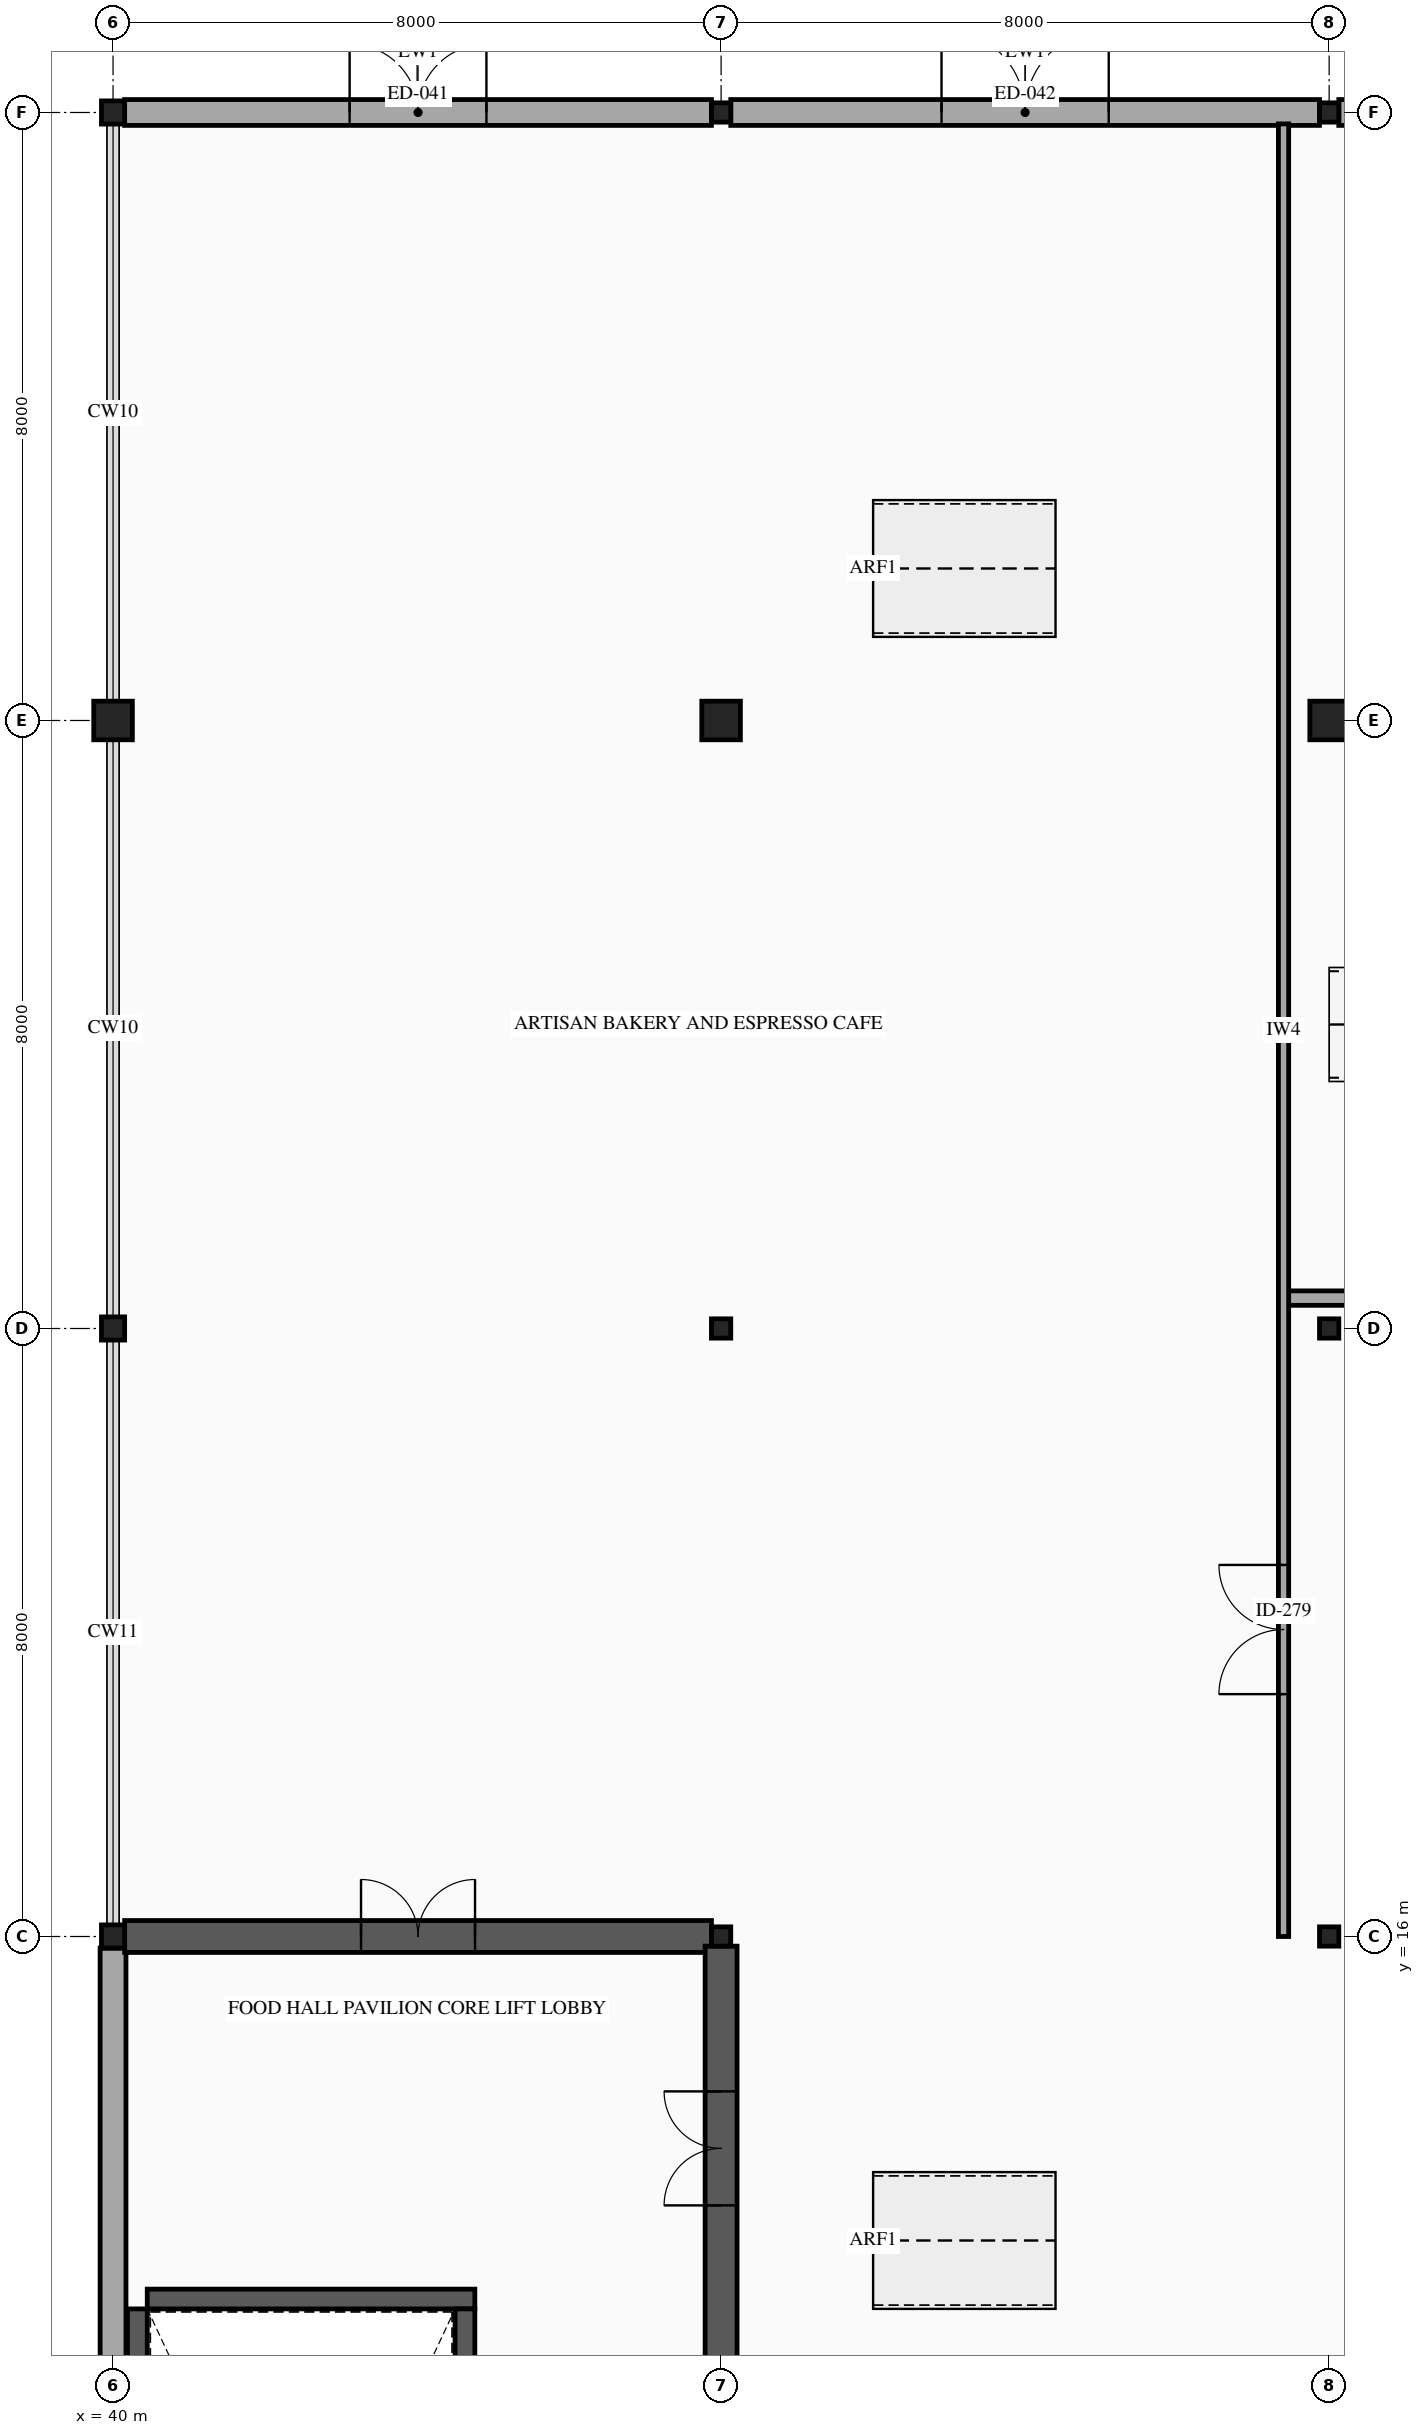
"""IFC4 building model, lengths in metres.
Left out: names, types, materials, properties, quantities, classifications, styles, units other than length and angle.
Written with IfcOpenShell. Run it as: python <this file> out.ifc"""

import sys

from ifc_helpers import new_model, si_unit, direction, frame, frame_2d, origin, origin_2d, place, context, subcontext, project, spatial, rectangle, hollow_rectangle, hollow_circle, extrude, element, fill, save


model = new_model("IFC4")
c1 = context("Model", 3, precision=1e-05, world=origin(), true_north=direction((0.0, 1.0)))
c2 = subcontext(c1, "Body", "Model", "MODEL_VIEW")
j1 = project(units=[si_unit("LENGTHUNIT", "METRE"), si_unit("PLANEANGLEUNIT", "RADIAN")], contexts=[c1])
p1 = place(None, origin())
s1 = spatial("IfcSite", under=j1, at=p1, CompositionType="ELEMENT")
p2 = place(p1, origin())
s2 = spatial("IfcBuilding", under=s1, at=p2, CompositionType="ELEMENT")
p3 = place(p2, origin())
s3 = spatial("IfcBuildingStorey", under=s2, at=p3, CompositionType="ELEMENT", Elevation=0.0)
for number, where, z_axis, x_axis in (
    (1, (40.0, 16.0, 0.0), (0.0, 0.0, 1.0), (1.0, 0.0, 0.0)),
    (2, (40.0, 24.0, 0.0), (0.0, 0.0, 1.0), (1.0, 0.0, 0.0)),
):
    element("IfcColumn", number, at=place(p3, frame(where, z_axis=z_axis, x_axis=x_axis)), inside=s3, PredefinedType="COLUMN", context=c2, shape_type="SweptSolid", body=[
        extrude(hollow_rectangle(XDim=0.305, YDim=0.305, WallThickness=0.012, InnerFilletRadius=0.012, OuterFilletRadius=0.024, at=origin_2d()), origin(), (0.0, 0.0, 1.0), 5.6),
    ])
p4 = place(p3, frame((40.0, 32.0, 0.0), z_axis=(0.0, 0.0, 1.0), x_axis=(1.0, 0.0, 0.0)))
e3 = element("IfcColumn", 3, at=p4, inside=s3, PredefinedType="COLUMN", context=c2, shape_type="SweptSolid", body=[
    extrude(hollow_circle(Radius=0.254, WallThickness=0.012, at=origin_2d()), origin(), (0.0, 0.0, 1.0), 5.6),
])
p5 = place(p3, frame((40.0, 40.0, 0.0), z_axis=(0.0, 0.0, 1.0), x_axis=(1.0, 0.0, 0.0)))
e4 = element("IfcColumn", 4, at=p5, inside=s3, PredefinedType="COLUMN", context=c2, shape_type="SweptSolid", body=[
    extrude(hollow_rectangle(XDim=0.305, YDim=0.305, WallThickness=0.012, InnerFilletRadius=0.012, OuterFilletRadius=0.024, at=origin_2d()), origin(), (0.0, 0.0, 1.0), 5.6),
])
for number, where, z_axis, x_axis in (
    (5, (48.0, 16.0, 0.0), (0.0, 0.0, 1.0), (1.0, 0.0, 0.0)),
    (6, (48.0, 24.0, 0.0), (0.0, 0.0, 1.0), (1.0, 0.0, 0.0)),
):
    element("IfcColumn", number, at=place(p3, frame(where, z_axis=z_axis, x_axis=x_axis)), inside=s3, PredefinedType="COLUMN", context=c2, shape_type="SweptSolid", body=[
        extrude(hollow_rectangle(XDim=0.254, YDim=0.254, WallThickness=0.009, InnerFilletRadius=0.009, OuterFilletRadius=0.018, at=origin_2d()), origin(), (0.0, 0.0, 1.0), 5.6),
    ])
p6 = place(p3, frame((48.0, 32.0, 0.0), z_axis=(0.0, 0.0, 1.0), x_axis=(1.0, 0.0, 0.0)))
e7 = element("IfcColumn", 7, at=p6, inside=s3, PredefinedType="COLUMN", context=c2, shape_type="SweptSolid", body=[
    extrude(hollow_circle(Radius=0.254, WallThickness=0.012, at=origin_2d()), origin(), (0.0, 0.0, 1.0), 5.6),
])
for number, where, z_axis, x_axis in (
    (8, (48.0, 40.0, 0.0), (0.0, 0.0, 1.0), (1.0, 0.0, 0.0)),
    (9, (56.0, 16.0, 0.0), (0.0, 0.0, 1.0), (1.0, 0.0, 0.0)),
    (10, (56.0, 24.0, 0.0), (0.0, 0.0, 1.0), (1.0, 0.0, 0.0)),
):
    element("IfcColumn", number, at=place(p3, frame(where, z_axis=z_axis, x_axis=x_axis)), inside=s3, PredefinedType="COLUMN", context=c2, shape_type="SweptSolid", body=[
        extrude(hollow_rectangle(XDim=0.254, YDim=0.254, WallThickness=0.009, InnerFilletRadius=0.009, OuterFilletRadius=0.018, at=origin_2d()), origin(), (0.0, 0.0, 1.0), 5.6),
    ])
p7 = place(p3, frame((56.0, 32.0, 0.0), z_axis=(0.0, 0.0, 1.0), x_axis=(1.0, 0.0, 0.0)))
e11 = element("IfcColumn", 11, at=p7, inside=s3, PredefinedType="COLUMN", context=c2, shape_type="SweptSolid", body=[
    extrude(hollow_circle(Radius=0.254, WallThickness=0.012, at=origin_2d()), origin(), (0.0, 0.0, 1.0), 5.6),
])
p8 = place(p3, frame((56.0, 40.0, 0.0), z_axis=(0.0, 0.0, 1.0), x_axis=(1.0, 0.0, 0.0)))
e12 = element("IfcColumn", 12, at=p8, inside=s3, PredefinedType="COLUMN", context=c2, shape_type="SweptSolid", body=[
    extrude(hollow_rectangle(XDim=0.254, YDim=0.254, WallThickness=0.009, InnerFilletRadius=0.009, OuterFilletRadius=0.018, at=origin_2d()), origin(), (0.0, 0.0, 1.0), 5.6),
])
p9 = place(p3, frame((40.0, 8.153, 0.0), z_axis=(0.0, 0.0, 1.0), x_axis=(0.0, 1.0, 0.0)))
e13 = element("IfcWall", 13, at=p9, inside=s3, PredefinedType="STANDARD", context=c2, shape_type="SweptSolid", body=[
    extrude(rectangle(XDim=7.695, YDim=0.34, at=frame_2d((3.847, 0.0))), origin(), (0.0, 0.0, 1.0), 4.58),
])
p10 = place(p3, frame((40.153, 40.0, 0.0), z_axis=(0.0, 0.0, 1.0), x_axis=(1.0, 0.0, 0.0)))
e14 = element("IfcWall", 14, at=p10, inside=s3, PredefinedType="STANDARD", context=c2, shape_type="SweptSolid", body=[
    extrude(rectangle(XDim=7.72, YDim=0.34, at=frame_2d((3.86, 0.0))), origin(), (0.0, 0.0, 1.0), 4.58),
])
p11 = place(p10, frame((2.96, 0.0, 0.0)))
e15 = element("IfcOpeningElement", 15, at=p11, cuts=e14, PredefinedType="OPENING", context=c2, shape_type="SweptSolid", body=[
    extrude(rectangle(XDim=1.8, YDim=2.3, at=frame_2d((0.9, 1.15))), frame((0.0, 0.18, 0.0), z_axis=(0.0, -1.0, 0.0), x_axis=(1.0, 0.0, 0.0)), (0.0, 0.0, 1.0), 0.36),
])
p12 = place(p3, frame((48.127, 40.0, 0.0), z_axis=(0.0, 0.0, 1.0), x_axis=(1.0, 0.0, 0.0)))
e16 = element("IfcWall", 16, at=p12, inside=s3, PredefinedType="STANDARD", context=c2, shape_type="SweptSolid", body=[
    extrude(rectangle(XDim=7.746, YDim=0.34, at=frame_2d((3.873, 0.0))), origin(), (0.0, 0.0, 1.0), 4.58),
])
p13 = place(p12, frame((2.773, 0.0, 0.0)))
e17 = element("IfcOpeningElement", 17, at=p13, cuts=e16, PredefinedType="OPENING", context=c2, shape_type="SweptSolid", body=[
    extrude(rectangle(XDim=2.2, YDim=2.45, at=frame_2d((1.1, 1.225))), frame((0.0, 0.18, 0.0), z_axis=(0.0, -1.0, 0.0), x_axis=(1.0, 0.0, 0.0)), (0.0, 0.0, 1.0), 0.36),
])
p14 = place(p3, frame((56.127, 40.0, 0.0), z_axis=(0.0, 0.0, 1.0), x_axis=(1.0, 0.0, 0.0)))
e18 = element("IfcWall", 18, at=p14, inside=s3, PredefinedType="STANDARD", context=c2, shape_type="SweptSolid", body=[
    extrude(rectangle(XDim=7.746, YDim=0.34, at=frame_2d((3.873, 0.0))), origin(), (0.0, 0.0, 1.0), 4.58),
])
p15 = place(p14, frame((2.873, 0.0, 0.0)))
e19 = element("IfcOpeningElement", 19, at=p15, cuts=e18, PredefinedType="OPENING", context=c2, shape_type="SweptSolid", body=[
    extrude(rectangle(XDim=2.0, YDim=2.35, at=frame_2d((1.0, 1.175))), frame((0.0, 0.18, 0.0), z_axis=(0.0, -1.0, 0.0), x_axis=(1.0, 0.0, 0.0)), (0.0, 0.0, 1.0), 0.36),
])
p16 = place(p3, frame((40.45, 11.23, 0.0), z_axis=(0.0, 0.0, 1.0), x_axis=(1.0, 0.0, 0.0)))
e20 = element("IfcWall", 20, at=p16, inside=s3, PredefinedType="SHEAR", context=c2, shape_type="SweptSolid", body=[
    extrude(rectangle(XDim=4.31, YDim=0.26, at=frame_2d((2.155, 0.0))), origin(), (0.0, 0.0, 1.0), 5.38),
])
p17 = place(p3, frame((40.32, 0.145, 0.0), z_axis=(0.0, 0.0, 1.0), x_axis=(0.0, 1.0, 0.0)))
e21 = element("IfcWall", 21, at=p17, inside=s3, PredefinedType="SHEAR", context=c2, shape_type="SweptSolid", body=[
    extrude(rectangle(XDim=10.955, YDim=0.26, at=frame_2d((5.478, 0.0))), origin(), (0.0, 0.0, 1.0), 5.38),
])
p18 = place(p3, frame((44.63, 0.145, 0.0), z_axis=(0.0, 0.0, 1.0), x_axis=(0.0, 1.0, 0.0)))
e22 = element("IfcWall", 22, at=p18, inside=s3, PredefinedType="SHEAR", context=c2, shape_type="SweptSolid", body=[
    extrude(rectangle(XDim=10.955, YDim=0.26, at=frame_2d((5.478, 0.0))), origin(), (0.0, 0.0, 1.0), 5.38),
])
p19 = place(p18, frame((0.805, 0.0, 0.0)))
e23 = element("IfcOpeningElement", 23, at=p19, cuts=e22, PredefinedType="OPENING", context=c2, shape_type="SweptSolid", body=[
    extrude(rectangle(XDim=1.05, YDim=2.15, at=frame_2d((0.525, 1.075))), frame((0.0, 0.14, 0.0), z_axis=(0.0, -1.0, 0.0), x_axis=(1.0, 0.0, 0.0)), (0.0, 0.0, 1.0), 0.28),
])
p20 = place(p3, frame((40.153, 16.0, 0.0), z_axis=(0.0, 0.0, 1.0), x_axis=(1.0, 0.0, 0.0)))
e24 = element("IfcWall", 24, at=p20, inside=s3, PredefinedType="SHEAR", context=c2, shape_type="SweptSolid", body=[
    extrude(rectangle(XDim=7.72, YDim=0.42, at=frame_2d((3.86, 0.0))), origin(), (0.0, 0.0, 1.0), 5.38),
])
p21 = place(p20, frame((3.11, 0.0, 0.0)))
e25 = element("IfcOpeningElement", 25, at=p21, cuts=e24, PredefinedType="OPENING", context=c2, shape_type="SweptSolid", body=[
    extrude(rectangle(XDim=1.5, YDim=2.15, at=frame_2d((0.75, 1.075))), frame((0.0, 0.22, 0.0), z_axis=(0.0, -1.0, 0.0), x_axis=(1.0, 0.0, 0.0)), (0.0, 0.0, 1.0), 0.44),
])
p22 = place(p3, frame((48.0, 8.127, 0.0), z_axis=(0.0, 0.0, 1.0), x_axis=(0.0, 1.0, 0.0)))
e26 = element("IfcWall", 26, at=p22, inside=s3, PredefinedType="SHEAR", context=c2, shape_type="SweptSolid", body=[
    extrude(rectangle(XDim=7.746, YDim=0.42, at=frame_2d((3.873, 0.0))), origin(), (0.0, 0.0, 1.0), 5.38),
])
p23 = place(p22, frame((4.335, 0.0, 0.0)))
e27 = element("IfcOpeningElement", 27, at=p23, cuts=e26, PredefinedType="OPENING", context=c2, shape_type="SweptSolid", body=[
    extrude(rectangle(XDim=1.5, YDim=2.15, at=frame_2d((0.75, 1.075))), frame((0.0, 0.22, 0.0), z_axis=(0.0, -1.0, 0.0), x_axis=(1.0, 0.0, 0.0)), (0.0, 0.0, 1.0), 0.44),
])
p24 = place(p3, frame((55.4, 24.4, 0.0), z_axis=(0.0, 0.0, 1.0), x_axis=(1.0, 0.0, 0.0)))
e28 = element("IfcWall", 28, at=p24, inside=s3, PredefinedType="PARTITIONING", context=c2, shape_type="SweptSolid", body=[
    extrude(rectangle(XDim=16.6, YDim=0.19, at=frame_2d((8.3, 0.0))), origin(), (0.0, 0.0, 1.0), 4.58),
])
p25 = place(p3, frame((55.4, 16.0, 0.0), z_axis=(0.0, 0.0, 1.0), x_axis=(0.0, 1.0, 0.0)))
e29 = element("IfcWall", 29, at=p25, inside=s3, PredefinedType="PARTITIONING", context=c2, shape_type="SweptSolid", body=[
    extrude(rectangle(XDim=23.85, YDim=0.135, at=frame_2d((11.925, 0.0))), origin(), (0.0, 0.0, 1.0), 4.58),
])
p26 = place(p25, frame((3.189, 0.0, 0.0)))
e30 = element("IfcOpeningElement", 30, at=p26, cuts=e29, PredefinedType="OPENING", context=c2, shape_type="SweptSolid", body=[
    extrude(rectangle(XDim=1.7, YDim=2.25, at=frame_2d((0.85, 1.125))), frame((0.0, 0.077, 0.0), z_axis=(0.0, -1.0, 0.0), x_axis=(1.0, 0.0, 0.0)), (0.0, 0.0, 1.0), 0.155),
])
p27 = place(p11, origin())
e31 = element("IfcDoor", 31, at=p27, inside=s3, OperationType="DOUBLE_DOOR_SINGLE_SWING", PredefinedType="DOOR", context=c2, shape_type="SweptSolid", body=[
    extrude(rectangle(XDim=1.8, YDim=2.3, at=frame_2d((0.9, 1.15))), frame((0.0, 0.025, 0.0), z_axis=(0.0, -1.0, 0.0), x_axis=(1.0, 0.0, 0.0)), (0.0, 0.0, 1.0), 0.05),
])
fill(e15, e31)
p28 = place(p13, origin())
e32 = element("IfcDoor", 32, at=p28, inside=s3, OperationType="DOUBLE_DOOR_SINGLE_SWING", PredefinedType="DOOR", context=c2, shape_type="SweptSolid", body=[
    extrude(rectangle(XDim=2.2, YDim=2.45, at=frame_2d((1.1, 1.225))), frame((0.0, 0.025, 0.0), z_axis=(0.0, -1.0, 0.0), x_axis=(1.0, 0.0, 0.0)), (0.0, 0.0, 1.0), 0.05),
])
fill(e17, e32)
p29 = place(p21, origin())
e33 = element("IfcDoor", 33, at=p29, inside=s3, OperationType="DOUBLE_DOOR_SINGLE_SWING", PredefinedType="DOOR", context=c2, shape_type="SweptSolid", body=[
    extrude(rectangle(XDim=1.5, YDim=2.15, at=frame_2d((0.75, 1.075))), frame((0.0, 0.025, 0.0), z_axis=(0.0, -1.0, 0.0), x_axis=(1.0, 0.0, 0.0)), (0.0, 0.0, 1.0), 0.05),
])
fill(e25, e33)
p30 = place(p23, origin())
e34 = element("IfcDoor", 34, at=p30, inside=s3, OperationType="DOUBLE_DOOR_SINGLE_SWING", PredefinedType="DOOR", context=c2, shape_type="SweptSolid", body=[
    extrude(rectangle(XDim=1.5, YDim=2.15, at=frame_2d((0.75, 1.075))), frame((0.0, 0.025, 0.0), z_axis=(0.0, -1.0, 0.0), x_axis=(1.0, 0.0, 0.0)), (0.0, 0.0, 1.0), 0.05),
])
fill(e27, e34)
p31 = place(p26, origin())
e35 = element("IfcDoor", 35, at=p31, inside=s3, OperationType="DOUBLE_DOOR_SINGLE_SWING", PredefinedType="DOOR", context=c2, shape_type="SweptSolid", body=[
    extrude(rectangle(XDim=1.7, YDim=2.25, at=frame_2d((0.85, 1.125))), frame((0.0, 0.025, 0.0), z_axis=(0.0, -1.0, 0.0), x_axis=(1.0, 0.0, 0.0)), (0.0, 0.0, 1.0), 0.05),
])
fill(e30, e35)
save(model, sys.argv[1])
